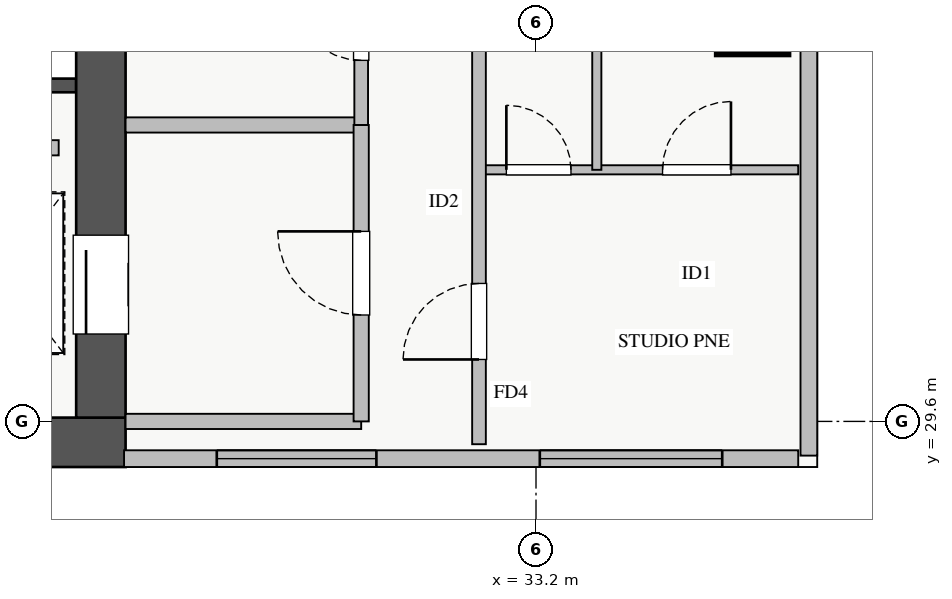
"""IFC4 building model, lengths in metres.
Left out: names, types, materials, properties, quantities, classifications, styles, units other than length and angle.
Written with IfcOpenShell. Run it as: python <this file> out.ifc"""

import sys

from ifc_helpers import new_model, si_unit, direction, frame, frame_2d, origin, origin_2d, place, context, subcontext, project, spatial, rectangle, extrude, source, transform, mapped, element, fill, save


model = new_model("IFC4")
c1 = context("Model", 3, precision=1e-05, world=origin(), true_north=direction((0.0, 1.0)))
c2 = subcontext(c1, "Body", "Model", "MODEL_VIEW")
j1 = project(units=[si_unit("LENGTHUNIT", "METRE"), si_unit("PLANEANGLEUNIT", "RADIAN")], contexts=[c1])
p1 = place(None, origin())
s1 = spatial("IfcSite", under=j1, at=p1, CompositionType="ELEMENT")
p2 = place(p1, origin())
s2 = spatial("IfcBuilding", under=s1, at=p2, CompositionType="ELEMENT")
p3 = place(p2, frame((0.0, 0.0, 160.0)))
s3 = spatial("IfcBuildingStorey", under=s2, at=p3, CompositionType="ELEMENT", Elevation=160.0)
p4 = place(p3, frame((25.8, 34.02, 0.0), z_axis=(0.0, 0.0, 1.0), x_axis=(1.0, 0.0, 0.0)))
e1 = element("IfcWall", 1, at=p4, inside=s3, PredefinedType="SHEAR", context=c2, shape_type="SweptSolid", body=[
    extrude(rectangle(XDim=1.35, YDim=0.18, at=frame_2d((0.675, 0.0))), origin(), (0.0, 0.0, 1.0), 3.07),
])
p5 = place(p3, frame((10.2, 29.325, 0.0), z_axis=(0.0, 0.0, 1.0), x_axis=(1.0, 0.0, 0.0)))
e2 = element("IfcWall", 2, at=p5, inside=s3, PredefinedType="SHEAR", context=c2, shape_type="SweptSolid", body=[
    extrude(rectangle(XDim=17.6, YDim=0.65, at=frame_2d((8.8, 0.0))), origin(), (0.0, 0.0, 1.0), 3.25),
])
p6 = place(p3, frame((27.475, 29.65, 0.0), z_axis=(0.0, 0.0, 1.0), x_axis=(0.0, 1.0, 0.0)))
e3 = element("IfcWall", 3, at=p6, inside=s3, PredefinedType="SHEAR", context=c2, shape_type="SweptSolid", body=[
    extrude(rectangle(XDim=5.9, YDim=0.65, at=frame_2d((2.95, 0.0))), origin(), (0.0, 0.0, 1.0), 3.25),
])
p7 = place(p6, frame((1.1, 0.0, 0.0)))
e4 = element("IfcOpeningElement", 4, at=p7, cuts=e3, PredefinedType="OPENING", context=c2, shape_type="SweptSolid", body=[
    extrude(rectangle(XDim=1.3, YDim=2.05, at=frame_2d((0.65, 1.025))), frame((0.0, 0.335, 0.0), z_axis=(0.0, -1.0, 0.0), x_axis=(1.0, 0.0, 0.0)), (0.0, 0.0, 1.0), 0.67),
])
m1 = source(origin(), c2, "Body", "SweptSolid", [
    extrude(rectangle(XDim=0.95, YDim=0.95, at=origin_2d()), origin(), (0.0, 0.0, 1.0), 3.25),
])
p8 = place(p3, frame((36.05, 34.9, 0.0), z_axis=(0.0, 0.0, 1.0), x_axis=(1.0, 0.0, 0.0)))
e5 = element("IfcColumn", 5, at=p8, inside=s3, PredefinedType="COLUMN", context=c2, shape_type="MappedRepresentation", body=[
    mapped(m1, transform((0.0, 0.0, 0.0), x_axis=(1.0, 0.0, 0.0), y_axis=(0.0, 1.0, 0.0), z_axis=(0.0, 0.0, 1.0), scale=1.0)),
])
p9 = place(p3, frame((27.78, 29.11, 0.0), z_axis=(0.0, 0.0, 1.0), x_axis=(1.0, 0.0, 0.0)))
e6 = element("IfcWall", 6, at=p9, inside=s3, PredefinedType="STANDARD", context=c2, shape_type="SweptSolid", body=[
    extrude(rectangle(XDim=8.87, YDim=0.22, at=frame_2d((4.435, 0.0))), origin(), (0.0, 0.0, 1.0), 2.61),
])
p10 = place(p9, frame((1.22, 0.0, 0.9)))
e7 = element("IfcOpeningElement", 7, at=p10, cuts=e6, PredefinedType="OPENING", context=c2, shape_type="SweptSolid", body=[
    extrude(rectangle(XDim=2.1, YDim=1.48, at=frame_2d((1.05, 0.74))), frame((0.0, 0.12, 0.0), z_axis=(0.0, -1.0, 0.0), x_axis=(1.0, 0.0, 0.0)), (0.0, 0.0, 1.0), 0.24),
])
p11 = place(p9, frame((5.47, 0.0, 0.9)))
e8 = element("IfcOpeningElement", 8, at=p11, cuts=e6, PredefinedType="OPENING", context=c2, shape_type="SweptSolid", body=[
    extrude(rectangle(XDim=2.4, YDim=1.48, at=frame_2d((1.2, 0.74))), frame((0.0, 0.12, 0.0), z_axis=(0.0, -1.0, 0.0), x_axis=(1.0, 0.0, 0.0)), (0.0, 0.0, 1.0), 0.24),
])
p12 = place(p3, frame((36.79, 29.15, 0.0), z_axis=(0.0, 0.0, 1.0), x_axis=(0.0, 1.0, 0.0)))
e9 = element("IfcWall", 9, at=p12, inside=s3, PredefinedType="STANDARD", context=c2, shape_type="SweptSolid", body=[
    extrude(rectangle(XDim=6.3, YDim=0.22, at=frame_2d((3.15, 0.0))), origin(), (0.0, 0.0, 1.0), 2.61),
])
for number, where, z_axis, x_axis in (
    (10, (27.8, 29.6, 0.0), (0.0, 0.0, 1.0), (1.0, 0.0, 0.0)),
    (11, (27.8, 33.5, 0.0), (0.0, 0.0, 1.0), (1.0, 0.0, 0.0)),
):
    element("IfcWall", number, at=place(p3, frame(where, z_axis=z_axis, x_axis=x_axis)), inside=s3, PredefinedType="PARTITIONING", context=c2, shape_type="SweptSolid", body=[
        extrude(rectangle(XDim=3.1, YDim=0.2, at=frame_2d((1.55, 0.0))), origin(), (0.0, 0.0, 1.0), 3.07),
    ])
p13 = place(p3, frame((30.9, 29.6, 0.0), z_axis=(0.0, 0.0, 1.0), x_axis=(0.0, 1.0, 0.0)))
e12 = element("IfcWall", 12, at=p13, inside=s3, PredefinedType="PARTITIONING", context=c2, shape_type="SweptSolid", body=[
    extrude(rectangle(XDim=3.9, YDim=0.2, at=frame_2d((1.95, 0.0))), origin(), (0.0, 0.0, 1.0), 3.07),
])
p14 = place(p13, frame((1.4, 0.0, 0.0)))
e13 = element("IfcOpeningElement", 13, at=p14, cuts=e12, PredefinedType="OPENING", context=c2, shape_type="SweptSolid", body=[
    extrude(rectangle(XDim=1.1, YDim=2.05, at=frame_2d((0.55, 1.025))), frame((0.0, 0.11, 0.0), z_axis=(0.0, -1.0, 0.0), x_axis=(1.0, 0.0, 0.0)), (0.0, 0.0, 1.0), 0.22),
])
p15 = place(p3, frame((21.75, 33.2, 0.0), z_axis=(0.0, 0.0, 1.0), x_axis=(1.0, 0.0, 0.0)))
e14 = element("IfcWall", 14, at=p15, inside=s3, PredefinedType="PARTITIONING", context=c2, shape_type="SweptSolid", body=[
    extrude(rectangle(XDim=5.17, YDim=0.2, at=frame_2d((2.585, 0.0))), origin(), (0.0, 0.0, 1.0), 3.07),
])
p16 = place(p3, frame((30.9, 33.5, 0.0), z_axis=(0.0, 0.0, 1.0), x_axis=(0.0, 1.0, 0.0)))
e15 = element("IfcWall", 15, at=p16, inside=s3, PredefinedType="PARTITIONING", context=c2, shape_type="SweptSolid", body=[
    extrude(rectangle(XDim=2.7, YDim=0.18, at=frame_2d((1.35, 0.0))), origin(), (0.0, 0.0, 1.0), 2.565),
])
p17 = place(p16, frame((0.85, 0.0, 0.0)))
e16 = element("IfcOpeningElement", 16, at=p17, cuts=e15, PredefinedType="OPENING", context=c2, shape_type="SweptSolid", body=[
    extrude(rectangle(XDim=0.9, YDim=2.05, at=frame_2d((0.45, 1.025))), frame((0.0, 0.1, 0.0), z_axis=(0.0, -1.0, 0.0), x_axis=(1.0, 0.0, 0.0)), (0.0, 0.0, 1.0), 0.2),
])
p18 = place(p3, frame((32.45, 32.91, 0.0), z_axis=(0.0, 0.0, 1.0), x_axis=(1.0, 0.0, 0.0)))
e17 = element("IfcWall", 17, at=p18, inside=s3, PredefinedType="PLUMBINGWALL", context=c2, shape_type="SweptSolid", body=[
    extrude(rectangle(XDim=4.2, YDim=0.12, at=frame_2d((2.1, 0.0))), origin(), (0.0, 0.0, 1.0), 3.07),
])
p19 = place(p18, frame((0.36, 0.0, 0.0)))
e18 = element("IfcOpeningElement", 18, at=p19, cuts=e17, PredefinedType="OPENING", context=c2, shape_type="SweptSolid", body=[
    extrude(rectangle(XDim=0.85, YDim=2.05, at=frame_2d((0.425, 1.025))), frame((0.0, 0.07, 0.0), z_axis=(0.0, -1.0, 0.0), x_axis=(1.0, 0.0, 0.0)), (0.0, 0.0, 1.0), 0.14),
])
p20 = place(p18, frame((2.415, 0.0, 0.0)))
e19 = element("IfcOpeningElement", 19, at=p20, cuts=e17, PredefinedType="OPENING", context=c2, shape_type="SweptSolid", body=[
    extrude(rectangle(XDim=0.9, YDim=2.05, at=frame_2d((0.45, 1.025))), frame((0.0, 0.07, 0.0), z_axis=(0.0, -1.0, 0.0), x_axis=(1.0, 0.0, 0.0)), (0.0, 0.0, 1.0), 0.14),
])
p21 = place(p3, frame((34.0, 32.91, 0.0), z_axis=(0.0, 0.0, 1.0), x_axis=(0.0, 1.0, 0.0)))
e20 = element("IfcWall", 20, at=p21, inside=s3, PredefinedType="PLUMBINGWALL", context=c2, shape_type="SweptSolid", body=[
    extrude(rectangle(XDim=3.07, YDim=0.12, at=frame_2d((1.535, 0.0))), origin(), (0.0, 0.0, 1.0), 3.07),
])
p22 = place(p3, frame((32.45, 29.3, 0.0), z_axis=(0.0, 0.0, 1.0), x_axis=(0.0, 1.0, 0.0)))
e21 = element("IfcWall", 21, at=p22, inside=s3, PredefinedType="PARTITIONING", context=c2, shape_type="SweptSolid", body=[
    extrude(rectangle(XDim=11.35, YDim=0.18, at=frame_2d((5.675, 0.0))), origin(), (0.0, 0.0, 1.0), 3.07),
])
p23 = place(p22, frame((1.115, 0.0, 0.0)))
e22 = element("IfcOpeningElement", 22, at=p23, cuts=e21, PredefinedType="OPENING", context=c2, shape_type="SweptSolid", body=[
    extrude(rectangle(XDim=1.0, YDim=2.05, at=frame_2d((0.5, 1.025))), frame((0.0, 0.1, 0.0), z_axis=(0.0, -1.0, 0.0), x_axis=(1.0, 0.0, 0.0)), (0.0, 0.0, 1.0), 0.2),
])
p24 = place(p22, frame((7.12, 0.0, 0.0)))
e23 = element("IfcOpeningElement", 23, at=p24, cuts=e21, PredefinedType="OPENING", context=c2, shape_type="SweptSolid", body=[
    extrude(rectangle(XDim=0.9, YDim=2.05, at=frame_2d((0.45, 1.025))), frame((0.0, 0.1, 0.0), z_axis=(0.0, -1.0, 0.0), x_axis=(1.0, 0.0, 0.0)), (0.0, 0.0, 1.0), 0.2),
])
m2 = source(origin(), c2, "Body", "SweptSolid", [
    extrude(rectangle(XDim=2.1, YDim=1.48, at=frame_2d((1.05, 0.74))), frame((0.0, 0.03, 0.0), z_axis=(0.0, -1.0, 0.0), x_axis=(1.0, 0.0, 0.0)), (0.0, 0.0, 1.0), 0.06),
])
p25 = place(p10, origin())
e24 = element("IfcWindow", 24, at=p25, inside=s3, PartitioningType="TRIPLE_PANEL_VERTICAL", PredefinedType="WINDOW", context=c2, shape_type="MappedRepresentation", body=[
    mapped(m2, transform((0.0, 0.0, 0.0), x_axis=(1.0, 0.0, 0.0), y_axis=(0.0, 1.0, 0.0), z_axis=(0.0, 0.0, 1.0), scale=1.0)),
])
fill(e7, e24)
m3 = source(origin(), c2, "Body", "SweptSolid", [
    extrude(rectangle(XDim=2.4, YDim=1.48, at=frame_2d((1.2, 0.74))), frame((0.0, 0.03, 0.0), z_axis=(0.0, -1.0, 0.0), x_axis=(1.0, 0.0, 0.0)), (0.0, 0.0, 1.0), 0.06),
])
p26 = place(p11, origin())
e25 = element("IfcWindow", 25, at=p26, inside=s3, PartitioningType="TRIPLE_PANEL_VERTICAL", PredefinedType="WINDOW", context=c2, shape_type="MappedRepresentation", body=[
    mapped(m3, transform((0.0, 0.0, 0.0), x_axis=(1.0, 0.0, 0.0), y_axis=(0.0, 1.0, 0.0), z_axis=(0.0, 0.0, 1.0), scale=1.0)),
])
fill(e8, e25)
m4 = source(origin(), c2, "Body", "SweptSolid", [
    extrude(rectangle(XDim=1.3, YDim=2.05, at=frame_2d((0.65, 1.025))), frame((0.0, 0.025, 0.0), z_axis=(0.0, -1.0, 0.0), x_axis=(1.0, 0.0, 0.0)), (0.0, 0.0, 1.0), 0.05),
])
p27 = place(p7, origin())
e26 = element("IfcDoor", 26, at=p27, inside=s3, OperationType="SLIDING_TO_LEFT", PredefinedType="DOOR", context=c2, shape_type="MappedRepresentation", body=[
    mapped(m4, transform((0.0, 0.0, 0.0), x_axis=(1.0, 0.0, 0.0), y_axis=(0.0, 1.0, 0.0), z_axis=(0.0, 0.0, 1.0), scale=1.0)),
])
fill(e4, e26)
m5 = source(origin(), c2, "Body", "SweptSolid", [
    extrude(rectangle(XDim=1.1, YDim=2.05, at=frame_2d((0.55, 1.025))), frame((0.0, 0.025, 0.0), z_axis=(0.0, -1.0, 0.0), x_axis=(1.0, 0.0, 0.0)), (0.0, 0.0, 1.0), 0.05),
])
p28 = place(p14, origin())
e27 = element("IfcDoor", 27, at=p28, inside=s3, OperationType="SINGLE_SWING_RIGHT", PredefinedType="DOOR", context=c2, shape_type="MappedRepresentation", body=[
    mapped(m5, transform((0.0, 0.0, 0.0), x_axis=(1.0, 0.0, 0.0), y_axis=(0.0, 1.0, 0.0), z_axis=(0.0, 0.0, 1.0), scale=1.0)),
])
fill(e13, e27)
m6 = source(origin(), c2, "Body", "SweptSolid", [
    extrude(rectangle(XDim=0.9, YDim=2.05, at=frame_2d((0.45, 1.025))), frame((0.0, 0.025, 0.0), z_axis=(0.0, -1.0, 0.0), x_axis=(1.0, 0.0, 0.0)), (0.0, 0.0, 1.0), 0.05),
])
p29 = place(p17, origin())
e28 = element("IfcDoor", 28, at=p29, inside=s3, OperationType="SINGLE_SWING_RIGHT", PredefinedType="DOOR", context=c2, shape_type="MappedRepresentation", body=[
    mapped(m6, transform((0.0, 0.0, 0.0), x_axis=(1.0, 0.0, 0.0), y_axis=(0.0, 1.0, 0.0), z_axis=(0.0, 0.0, 1.0), scale=1.0)),
])
fill(e16, e28)
m7 = source(origin(), c2, "Body", "SweptSolid", [
    extrude(rectangle(XDim=0.85, YDim=2.05, at=frame_2d((0.425, 1.025))), frame((0.0, 0.025, 0.0), z_axis=(0.0, -1.0, 0.0), x_axis=(1.0, 0.0, 0.0)), (0.0, 0.0, 1.0), 0.05),
])
p30 = place(p19, origin())
e29 = element("IfcDoor", 29, at=p30, inside=s3, OperationType="SINGLE_SWING_LEFT", PredefinedType="DOOR", context=c2, shape_type="MappedRepresentation", body=[
    mapped(m7, transform((0.0, 0.0, 0.0), x_axis=(1.0, 0.0, 0.0), y_axis=(0.0, 1.0, 0.0), z_axis=(0.0, 0.0, 1.0), scale=1.0)),
])
fill(e18, e29)
p31 = place(p20, origin())
e30 = element("IfcDoor", 30, at=p31, inside=s3, OperationType="SINGLE_SWING_RIGHT", PredefinedType="DOOR", context=c2, shape_type="MappedRepresentation", body=[
    mapped(m6, transform((0.0, 0.0, 0.0), x_axis=(1.0, 0.0, 0.0), y_axis=(0.0, 1.0, 0.0), z_axis=(0.0, 0.0, 1.0), scale=1.0)),
])
fill(e19, e30)
m8 = source(origin(), c2, "Body", "SweptSolid", [
    extrude(rectangle(XDim=1.0, YDim=2.05, at=frame_2d((0.5, 1.025))), frame((0.0, 0.025, 0.0), z_axis=(0.0, -1.0, 0.0), x_axis=(1.0, 0.0, 0.0)), (0.0, 0.0, 1.0), 0.05),
])
p32 = place(p23, origin())
e31 = element("IfcDoor", 31, at=p32, inside=s3, OperationType="SINGLE_SWING_LEFT", PredefinedType="DOOR", context=c2, shape_type="MappedRepresentation", body=[
    mapped(m8, transform((0.0, 0.0, 0.0), x_axis=(1.0, 0.0, 0.0), y_axis=(0.0, 1.0, 0.0), z_axis=(0.0, 0.0, 1.0), scale=1.0)),
])
fill(e22, e31)
save(model, sys.argv[1])
